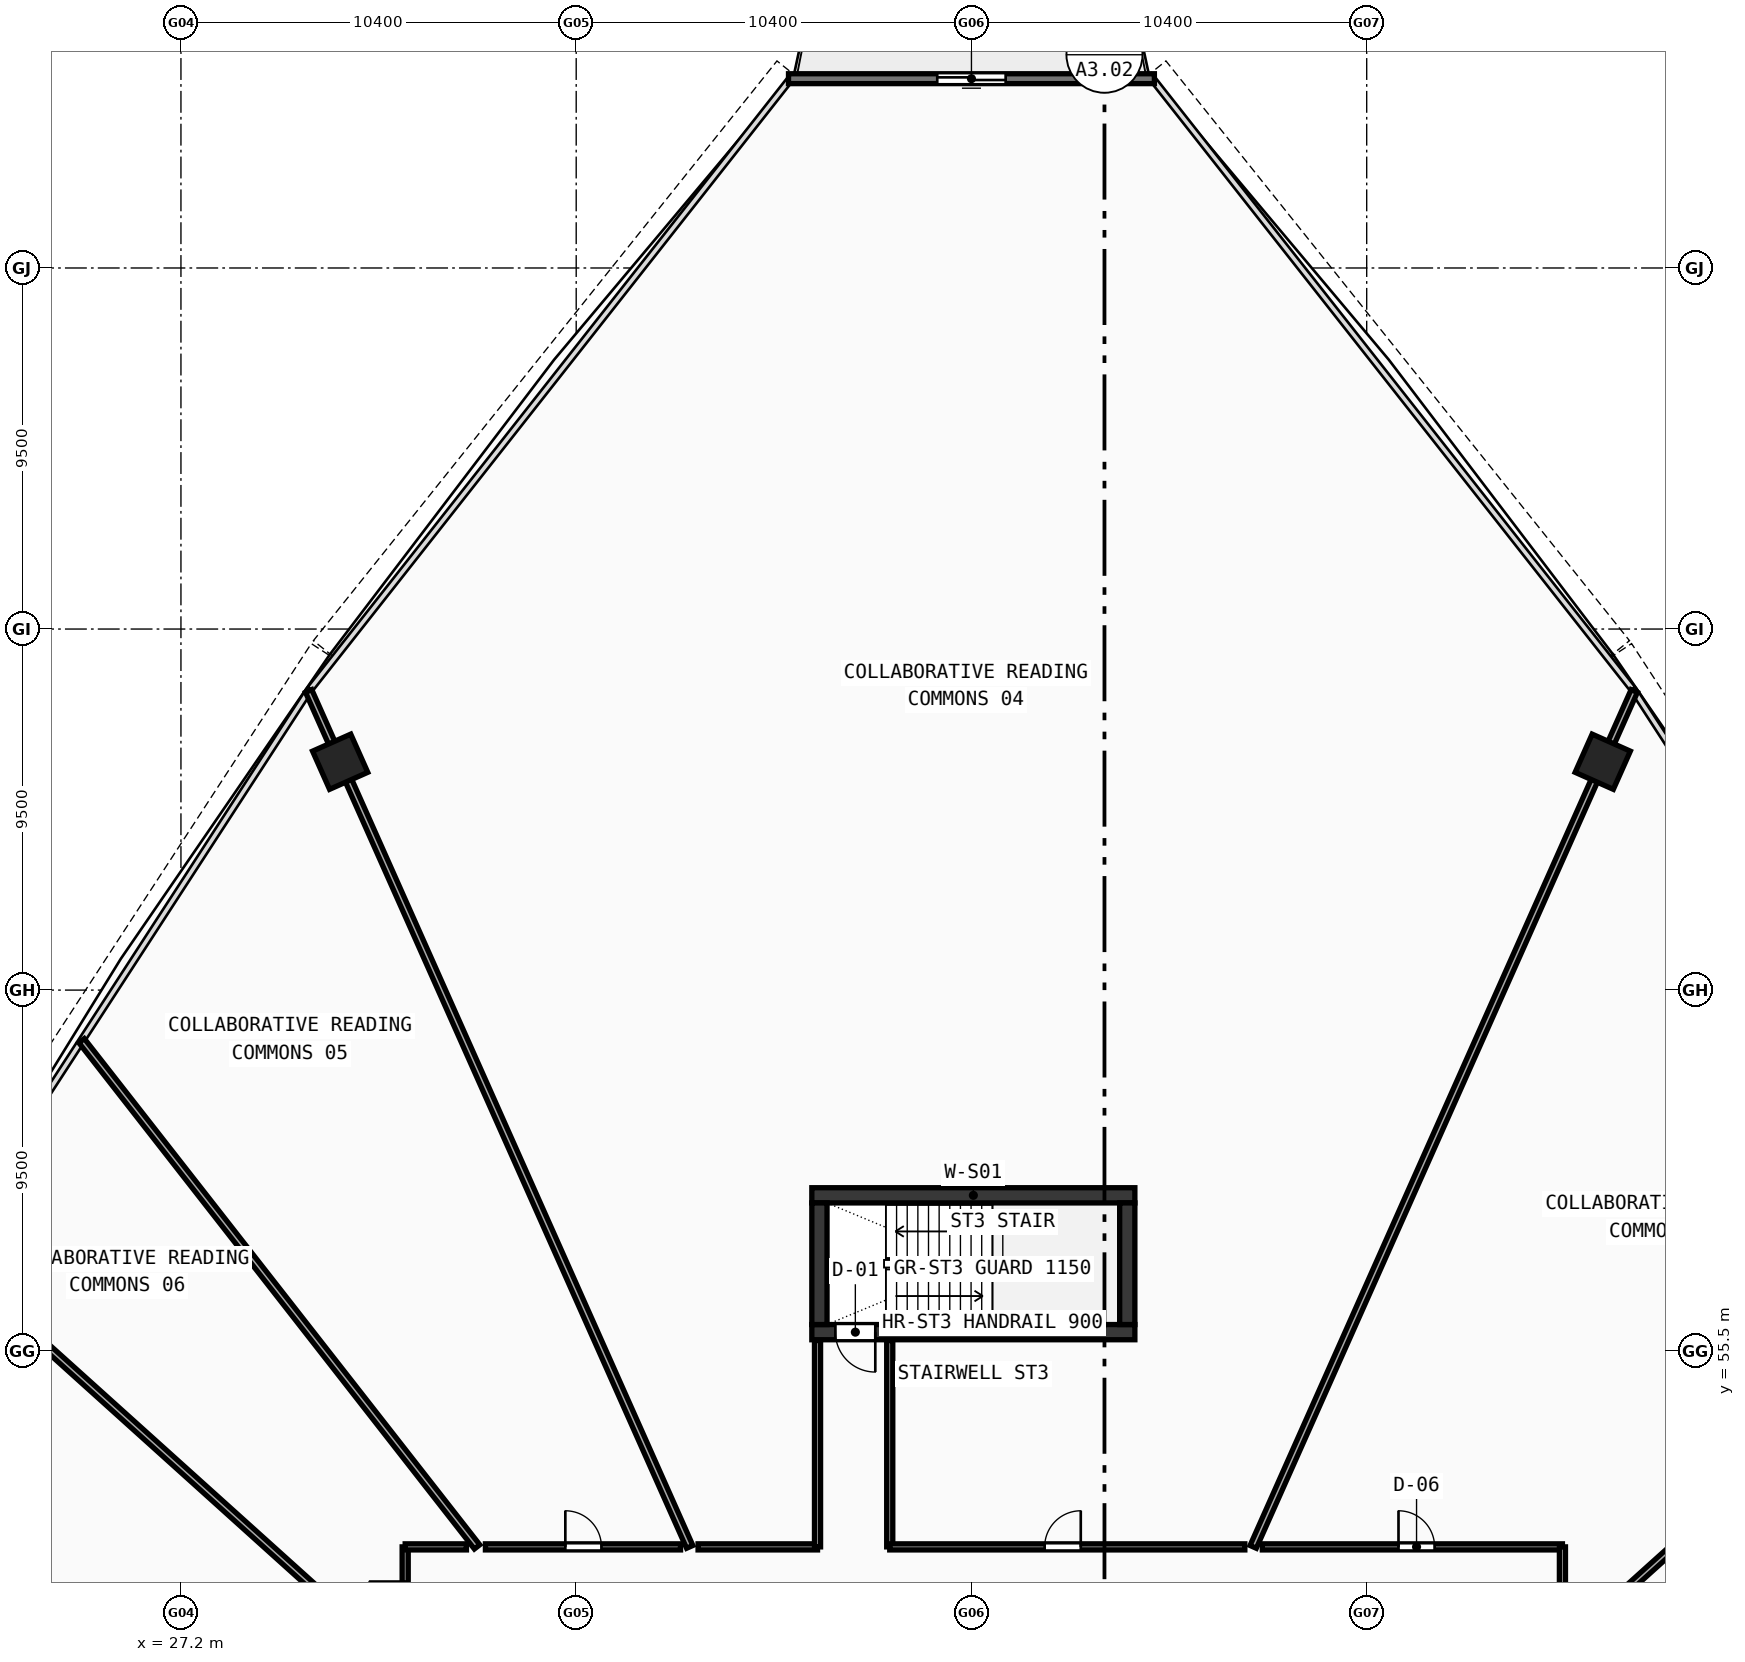
"""IFC4 building model, lengths in metres.
Left out: names, types, materials, properties, quantities, classifications, styles, units other than length and angle.
Written with IfcOpenShell. Run it as: python <this file> out.ifc"""

import sys

from ifc_helpers import new_model, si_unit, direction, frame, frame_2d, origin, origin_with_axes, origin_2d, place, context, subcontext, project, spatial, rectangle, hollow_rectangle, extrude, source, transform, mapped, element, fill, save


model = new_model("IFC4")
c1 = context("Model", 3, precision=1e-05, world=origin(), true_north=direction((0.0, 1.0)))
c2 = subcontext(c1, "Body", "Model", "MODEL_VIEW")
j1 = project(units=[si_unit("LENGTHUNIT", "METRE"), si_unit("PLANEANGLEUNIT", "RADIAN")], contexts=[c1])
p1 = place(None, origin())
s1 = spatial("IfcSite", under=j1, at=p1, CompositionType="ELEMENT")
p2 = place(p1, origin())
s2 = spatial("IfcBuilding", under=s1, at=p2, CompositionType="ELEMENT")
p3 = place(p2, frame((0.0, 0.0, 30.4)))
s3 = spatial("IfcBuildingStorey", under=s2, at=p3, CompositionType="ELEMENT", Elevation=30.4)
p4 = place(p3, frame((43.8, 59.6, 0.0), z_axis=(0.0, 0.0, 1.0), x_axis=(1.0, 0.0, 0.0)))
e1 = element("IfcWall", 1, at=p4, inside=s3, PredefinedType="SHEAR", context=c2, shape_type="SweptSolid", body=[
    extrude(rectangle(XDim=8.5, YDim=0.4, at=frame_2d((4.25, 0.0))), origin(), (0.0, 0.0, 1.0), 3.37),
])
p5 = place(p3, frame((43.8, 56.0, 0.0), z_axis=(0.0, 0.0, 1.0), x_axis=(1.0, 0.0, 0.0)))
e2 = element("IfcWall", 2, at=p5, inside=s3, PredefinedType="SHEAR", context=c2, shape_type="SweptSolid", body=[
    extrude(rectangle(XDim=8.5, YDim=0.4, at=frame_2d((4.25, 0.0))), origin(), (0.0, 0.0, 1.0), 3.37),
])
p6 = place(p5, frame((0.62, 0.0, 0.0)))
e3 = element("IfcOpeningElement", 3, at=p6, cuts=e2, PredefinedType="OPENING", context=c2, shape_type="SweptSolid", body=[
    extrude(rectangle(XDim=1.05, YDim=2.1, at=frame_2d((0.525, 1.05))), frame((0.0, 0.21, 0.0), z_axis=(0.0, -1.0, 0.0), x_axis=(1.0, 0.0, 0.0)), (0.0, 0.0, 1.0), 0.42),
])
for number, where, z_axis, x_axis in (
    (4, (44.0, 56.2, 0.0), (0.0, 0.0, 1.0), (0.0, 1.0, 0.0)),
    (5, (52.1, 56.2, 0.0), (0.0, 0.0, 1.0), (0.0, 1.0, 0.0)),
):
    element("IfcWall", number, at=place(p3, frame(where, z_axis=z_axis, x_axis=x_axis)), inside=s3, PredefinedType="SHEAR", context=c2, shape_type="SweptSolid", body=[
        extrude(rectangle(XDim=3.2, YDim=0.4, at=frame_2d((1.6, 0.0))), origin(), (0.0, 0.0, 1.0), 3.37),
    ])
m1 = source(origin(), c2, "Body", "SweptSolid", [
    extrude(hollow_rectangle(XDim=1.1, YDim=1.1, WallThickness=0.045, at=origin_2d()), origin(), (0.0, 0.0, 1.0), 3.63),
])
for number, where, z_axis, x_axis in (
    (6, (64.611, 71.009, -0.26), (0.0, 0.0, 1.0), (-0.914, 0.407, 0.0)),
    (7, (31.389, 71.009, -0.26), (0.0, 0.0, 1.0), (-0.914, -0.407, 0.0)),
):
    element("IfcColumn", number, at=place(p3, frame(where, z_axis=z_axis, x_axis=x_axis)), inside=s3, PredefinedType="COLUMN", context=c2, shape_type="MappedRepresentation", body=[
        mapped(m1, transform((0.0, 0.0, 0.0), scale=1.0)),
    ])
p7 = place(p3, frame((52.814, 88.981, 0.0), z_axis=(0.0, 0.0, 1.0), x_axis=(-1.0, 0.0, 0.0)))
e8 = element("IfcWall", 8, at=p7, inside=s3, PredefinedType="STANDARD", context=c2, shape_type="SweptSolid", body=[
    extrude(rectangle(XDim=9.627, YDim=0.26, at=frame_2d((4.814, 0.0))), origin(), (0.0, 0.0, 1.0), 3.37),
])
p8 = place(p7, frame((3.914, 0.0, 0.0)))
e9 = element("IfcOpeningElement", 9, at=p8, cuts=e8, PredefinedType="OPENING", context=c2, shape_type="SweptSolid", body=[
    extrude(rectangle(XDim=1.8, YDim=2.15, at=frame_2d((0.9, 1.075))), frame((0.0, 0.14, 0.0), z_axis=(0.0, -1.0, 0.0), x_axis=(1.0, 0.0, 0.0)), (0.0, 0.0, 1.0), 0.28),
])
p9 = place(p3, frame((63.55, 47.701, 0.0), z_axis=(0.0, 0.0, 1.0), x_axis=(0.743145159556, 0.669130235326, 0.0)))
e10 = element("IfcWall", 10, at=p9, inside=s3, PredefinedType="PARTITIONING", context=c2, shape_type="SweptSolid", body=[
    extrude(rectangle(XDim=15.483, YDim=0.18, at=frame_2d((7.742, 0.0))), origin(), (0.0, 0.0, 1.0), 2.67),
])
for number, where, z_axis, x_axis in (
    (11, (55.413, 50.35, 0.0), (0.0, 0.0, 1.0), (0.407, 0.914, 0.0)),
    (12, (40.587, 50.35, 0.0), (0.0, 0.0, 1.0), (-0.407, 0.914, 0.0)),
):
    element("IfcWall", number, at=place(p3, frame(where, z_axis=z_axis, x_axis=x_axis)), inside=s3, PredefinedType="PARTITIONING", context=c2, shape_type="SweptSolid", body=[
        extrude(rectangle(XDim=24.65, YDim=0.18, at=frame_2d((12.325, 0.0))), origin(), (0.0, 0.0, 1.0), 2.67),
    ])
p10 = place(p3, frame((34.992, 50.35, 0.0), z_axis=(0.0, 0.0, 1.0), x_axis=(-0.615670109541, 0.788004007742, 0.0)))
e13 = element("IfcWall", 13, at=p10, inside=s3, PredefinedType="PARTITIONING", context=c2, shape_type="SweptSolid", body=[
    extrude(rectangle(XDim=16.902, YDim=0.18, at=frame_2d((8.451, 0.0))), origin(), (0.0, 0.0, 1.0), 2.67),
])
p11 = place(p3, frame((33.1, 47.116, 0.0), z_axis=(0.0, 0.0, 1.0), x_axis=(-0.74314347906, 0.669132101704, 0.0)))
e14 = element("IfcWall", 14, at=p11, inside=s3, PredefinedType="PARTITIONING", context=c2, shape_type="SweptSolid", body=[
    extrude(rectangle(XDim=16.358, YDim=0.18, at=frame_2d((8.179, 0.0))), origin(), (0.0, 0.0, 1.0), 2.67),
])
p12 = place(p3, frame((33.1, 47.412, 0.0), z_axis=(0.0, 0.0, 1.0), x_axis=(0.0, 1.0, 0.0)))
e15 = element("IfcWall", 15, at=p12, inside=s3, PredefinedType="PARTITIONING", context=c2, shape_type="SweptSolid", body=[
    extrude(rectangle(XDim=2.938, YDim=0.16, at=frame_2d((1.469, 0.0))), origin(), (0.0, 0.0, 1.0), 3.37),
])
p13 = place(p12, frame((1.076, 0.0, 0.0)))
e16 = element("IfcOpeningElement", 16, at=p13, cuts=e15, PredefinedType="OPENING", context=c2, shape_type="SweptSolid", body=[
    extrude(rectangle(XDim=0.95, YDim=2.1, at=frame_2d((0.475, 1.05))), frame((0.0, 0.09, 0.0), z_axis=(0.0, -1.0, 0.0), x_axis=(1.0, 0.0, 0.0)), (0.0, 0.0, 1.0), 0.18),
])
p14 = place(p3, frame((33.1, 50.35, 0.0), z_axis=(0.0, 0.0, 1.0), x_axis=(1.0, 0.0, 0.0)))
e17 = element("IfcWall", 17, at=p14, inside=s3, PredefinedType="PARTITIONING", context=c2, shape_type="SweptSolid", body=[
    extrude(rectangle(XDim=1.612, YDim=0.16, at=frame_2d((0.806, 0.0))), origin(), (0.0, 0.0, 1.0), 3.37),
])
p15 = place(p3, frame((35.211, 50.35, 0.0), z_axis=(0.0, 0.0, 1.0), x_axis=(1.0, 0.0, 0.0)))
e18 = element("IfcWall", 18, at=p15, inside=s3, PredefinedType="PARTITIONING", context=c2, shape_type="SweptSolid", body=[
    extrude(rectangle(XDim=5.135, YDim=0.16, at=frame_2d((2.567, 0.0))), origin(), (0.0, 0.0, 1.0), 2.97),
])
p16 = place(p15, frame((2.103, 0.0, 0.0)))
e19 = element("IfcOpeningElement", 19, at=p16, cuts=e18, PredefinedType="OPENING", context=c2, shape_type="SweptSolid", body=[
    extrude(rectangle(XDim=0.95, YDim=2.1, at=frame_2d((0.475, 1.05))), frame((0.0, 0.09, 0.0), z_axis=(0.0, -1.0, 0.0), x_axis=(1.0, 0.0, 0.0)), (0.0, 0.0, 1.0), 0.18),
])
p17 = place(p3, frame((40.807, 50.35, 0.0), z_axis=(0.0, 0.0, 1.0), x_axis=(1.0, 0.0, 0.0)))
e20 = element("IfcWall", 20, at=p17, inside=s3, PredefinedType="PARTITIONING", context=c2, shape_type="SweptSolid", body=[
    extrude(rectangle(XDim=3.143, YDim=0.16, at=frame_2d((1.572, 0.0))), origin(), (0.0, 0.0, 1.0), 2.67),
])
for number, where, z_axis, x_axis in (
    (21, (43.95, 50.35, 0.0), (0.0, 0.0, 1.0), (0.0, 1.0, 0.0)),
    (22, (45.85, 55.78, 0.0), (0.0, 0.0, 1.0), (0.0, -1.0, 0.0)),
):
    element("IfcWall", number, at=place(p3, frame(where, z_axis=z_axis, x_axis=x_axis)), inside=s3, PredefinedType="PARTITIONING", context=c2, shape_type="SweptSolid", body=[
        extrude(rectangle(XDim=5.43, YDim=0.16, at=frame_2d((2.715, 0.0))), origin(), (0.0, 0.0, 1.0), 2.97),
    ])
p18 = place(p3, frame((45.85, 50.35, 0.0), z_axis=(0.0, 0.0, 1.0), x_axis=(1.0, 0.0, 0.0)))
e23 = element("IfcWall", 23, at=p18, inside=s3, PredefinedType="PARTITIONING", context=c2, shape_type="SweptSolid", body=[
    extrude(rectangle(XDim=9.343, YDim=0.16, at=frame_2d((4.672, 0.0))), origin(), (0.0, 0.0, 1.0), 2.67),
])
p19 = place(p18, frame((4.076, 0.0, 0.0)))
e24 = element("IfcOpeningElement", 24, at=p19, cuts=e23, PredefinedType="OPENING", context=c2, shape_type="SweptSolid", body=[
    extrude(rectangle(XDim=0.95, YDim=2.1, at=frame_2d((0.475, 1.05))), frame((0.0, 0.09, 0.0), z_axis=(0.0, -1.0, 0.0), x_axis=(1.0, 0.0, 0.0)), (0.0, 0.0, 1.0), 0.18),
])
p20 = place(p3, frame((55.654, 50.35, 0.0), z_axis=(0.0, 0.0, 1.0), x_axis=(1.0, 0.0, 0.0)))
e25 = element("IfcWall", 25, at=p20, inside=s3, PredefinedType="PARTITIONING", context=c2, shape_type="SweptSolid", body=[
    extrude(rectangle(XDim=7.896, YDim=0.16, at=frame_2d((3.948, 0.0))), origin(), (0.0, 0.0, 1.0), 2.97),
])
p21 = place(p20, frame((3.583, 0.0, 0.0)))
e26 = element("IfcOpeningElement", 26, at=p21, cuts=e25, PredefinedType="OPENING", context=c2, shape_type="SweptSolid", body=[
    extrude(rectangle(XDim=0.95, YDim=2.1, at=frame_2d((0.475, 1.05))), frame((0.0, 0.09, 0.0), z_axis=(0.0, -1.0, 0.0), x_axis=(1.0, 0.0, 0.0)), (0.0, 0.0, 1.0), 0.18),
])
p22 = place(p3, frame((63.55, 50.35, 0.0), z_axis=(0.0, 0.0, 1.0), x_axis=(0.0, -1.0, 0.0)))
e27 = element("IfcWall", 27, at=p22, inside=s3, PredefinedType="PARTITIONING", context=c2, shape_type="SweptSolid", body=[
    extrude(rectangle(XDim=2.353, YDim=0.16, at=frame_2d((1.176, 0.0))), origin(), (0.0, 0.0, 1.0), 3.37),
])
m2 = source(origin(), c2, "Body", "SweptSolid", [
    extrude(rectangle(XDim=1.8, YDim=2.15, at=frame_2d((0.9, 1.075))), frame((0.0, 0.025, 0.0), z_axis=(0.0, -1.0, 0.0), x_axis=(1.0, 0.0, 0.0)), (0.0, 0.0, 1.0), 0.05),
])
p23 = place(p8, origin_with_axes())
e28 = element("IfcDoor", 28, at=p23, inside=s3, OperationType="DOUBLE_DOOR_SLIDING", PredefinedType="DOOR", context=c2, shape_type="MappedRepresentation", body=[
    mapped(m2, transform((0.0, 0.0, 0.0), scale=1.0)),
])
fill(e9, e28)
m3 = source(origin(), c2, "Body", "SweptSolid", [
    extrude(rectangle(XDim=1.05, YDim=2.1, at=frame_2d((0.525, 1.05))), frame((0.0, 0.025, 0.0), z_axis=(0.0, -1.0, 0.0), x_axis=(1.0, 0.0, 0.0)), (0.0, 0.0, 1.0), 0.05),
])
p24 = place(p6, frame((1.05, 0.0, 0.0), z_axis=(0.0, 0.0, 1.0), x_axis=(-1.0, 0.0, 0.0)))
e29 = element("IfcDoor", 29, at=p24, inside=s3, OperationType="SINGLE_SWING_LEFT", PredefinedType="DOOR", context=c2, shape_type="MappedRepresentation", body=[
    mapped(m3, transform((0.0, 0.0, 0.0), scale=1.0)),
])
fill(e3, e29)
m4 = source(origin(), c2, "Body", "SweptSolid", [
    extrude(rectangle(XDim=0.95, YDim=2.1, at=frame_2d((0.475, 1.05))), frame((0.0, 0.025, 0.0), z_axis=(0.0, -1.0, 0.0), x_axis=(1.0, 0.0, 0.0)), (0.0, 0.0, 1.0), 0.05),
])
p25 = place(p21, origin_with_axes())
e30 = element("IfcDoor", 30, at=p25, inside=s3, OperationType="SINGLE_SWING_LEFT", PredefinedType="DOOR", context=c2, shape_type="MappedRepresentation", body=[
    mapped(m4, transform((0.0, 0.0, 0.0), scale=1.0)),
])
fill(e26, e30)
p26 = place(p19, origin_with_axes())
e31 = element("IfcDoor", 31, at=p26, inside=s3, OperationType="SINGLE_SWING_RIGHT", PredefinedType="DOOR", context=c2, shape_type="MappedRepresentation", body=[
    mapped(m4, transform((0.0, 0.0, 0.0), scale=1.0)),
])
fill(e24, e31)
p27 = place(p16, origin_with_axes())
e32 = element("IfcDoor", 32, at=p27, inside=s3, OperationType="SINGLE_SWING_LEFT", PredefinedType="DOOR", context=c2, shape_type="MappedRepresentation", body=[
    mapped(m4, transform((0.0, 0.0, 0.0), scale=1.0)),
])
fill(e19, e32)
p28 = place(p13, origin_with_axes())
e33 = element("IfcDoor", 33, at=p28, inside=s3, OperationType="SINGLE_SWING_RIGHT", PredefinedType="DOOR", context=c2, shape_type="MappedRepresentation", body=[
    mapped(m4, transform((0.0, 0.0, 0.0), scale=1.0)),
])
fill(e16, e33)
save(model, sys.argv[1])
